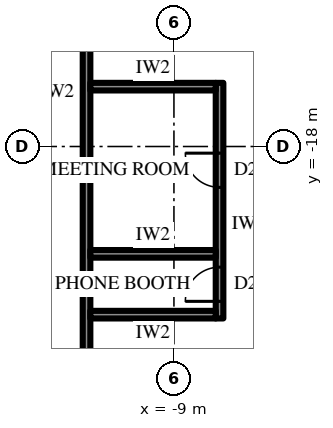
"""IFC4 building model, lengths in metres.
Left out: names, types, materials, properties, quantities, classifications, styles, units other than length and angle.
Written with IfcOpenShell. Run it as: python <this file> out.ifc"""

import sys

from ifc_helpers import new_model, si_unit, direction, frame, frame_2d, origin, place, context, subcontext, project, spatial, rectangle, extrude, element, fill, save


model = new_model("IFC4")
c1 = context("Model", 3, precision=1e-05, world=origin(), true_north=direction((0.0, 1.0)))
c2 = subcontext(c1, "Body", "Model", "MODEL_VIEW")
j1 = project(units=[si_unit("LENGTHUNIT", "METRE"), si_unit("PLANEANGLEUNIT", "RADIAN")], contexts=[c1])
p1 = place(None, origin())
s1 = spatial("IfcSite", under=j1, at=p1, CompositionType="ELEMENT")
p2 = place(p1, origin())
s2 = spatial("IfcBuilding", under=s1, at=p2, CompositionType="ELEMENT")
p3 = place(p2, frame((0.0, 0.0, 387.1)))
s3 = spatial("IfcBuildingStorey", under=s2, at=p3, CompositionType="ELEMENT", Elevation=387.1)
p4 = place(p3, frame((-11.3, -12.3, 0.0), z_axis=(0.0, 0.0, 1.0), x_axis=(0.0, -1.0, 0.0)))
e1 = element("IfcWall", 1, at=p4, inside=s3, PredefinedType="PARTITIONING", context=c2, shape_type="SweptSolid", body=[
    extrude(rectangle(XDim=14.25, YDim=0.2, at=frame_2d((7.125, 0.0))), origin(), (0.0, 0.0, 1.0), 4.0),
])
p5 = place(p4, frame((0.925, 0.0, 0.0)))
e2 = element("IfcOpeningElement", 2, at=p5, cuts=e1, PredefinedType="OPENING", context=c2, shape_type="SweptSolid", body=[
    extrude(rectangle(XDim=1.0, YDim=2.2, at=frame_2d((0.5, 1.1))), frame((0.0, 0.11, 0.0), z_axis=(0.0, -1.0, 0.0), x_axis=(1.0, 0.0, 0.0)), (0.0, 0.0, 1.0), 0.22),
])
p6 = place(p3, frame((-7.8, -16.325, 0.0), z_axis=(0.0, 0.0, 1.0), x_axis=(0.0, -1.0, 0.0)))
e3 = element("IfcWall", 3, at=p6, inside=s3, PredefinedType="PARTITIONING", context=c2, shape_type="SweptSolid", body=[
    extrude(rectangle(XDim=6.2, YDim=0.2, at=frame_2d((3.1, 0.0))), origin(), (0.0, 0.0, 1.0), 4.0),
])
p7 = place(p6, frame((1.85, 0.0, 0.0)))
e4 = element("IfcOpeningElement", 4, at=p7, cuts=e3, PredefinedType="OPENING", context=c2, shape_type="SweptSolid", body=[
    extrude(rectangle(XDim=0.9, YDim=2.2, at=frame_2d((0.45, 1.1))), frame((0.0, 0.11, 0.0), z_axis=(0.0, -1.0, 0.0), x_axis=(1.0, 0.0, 0.0)), (0.0, 0.0, 1.0), 0.22),
])
p8 = place(p6, frame((4.85, 0.0, 0.0)))
e5 = element("IfcOpeningElement", 5, at=p8, cuts=e3, PredefinedType="OPENING", context=c2, shape_type="SweptSolid", body=[
    extrude(rectangle(XDim=0.9, YDim=2.2, at=frame_2d((0.45, 1.1))), frame((0.0, 0.11, 0.0), z_axis=(0.0, -1.0, 0.0), x_axis=(1.0, 0.0, 0.0)), (0.0, 0.0, 1.0), 0.22),
])
for number, where, z_axis, x_axis in (
    (6, (-11.2, -16.425, 0.0), (0.0, 0.0, 1.0), (1.0, 0.0, 0.0)),
    (7, (-11.2, -20.825, 0.0), (0.0, 0.0, 1.0), (1.0, 0.0, 0.0)),
    (8, (-11.2, -22.425, 0.0), (0.0, 0.0, 1.0), (1.0, 0.0, 0.0)),
):
    element("IfcWall", number, at=place(p3, frame(where, z_axis=z_axis, x_axis=x_axis)), inside=s3, PredefinedType="PARTITIONING", context=c2, shape_type="SweptSolid", body=[
        extrude(rectangle(XDim=3.3, YDim=0.2, at=frame_2d((1.65, 0.0))), origin(), (0.0, 0.0, 1.0), 4.0),
    ])
p9 = place(p7, frame((0.9, 0.0, 0.0), z_axis=(0.0, 0.0, 1.0), x_axis=(-1.0, 0.0, 0.0)))
e9 = element("IfcDoor", 9, at=p9, inside=s3, OperationType="SINGLE_SWING_LEFT", PredefinedType="DOOR", context=c2, shape_type="SweptSolid", body=[
    extrude(rectangle(XDim=0.9, YDim=2.2, at=frame_2d((0.45, 1.1))), frame((0.0, 0.025, 0.0), z_axis=(0.0, -1.0, 0.0), x_axis=(1.0, 0.0, 0.0)), (0.0, 0.0, 1.0), 0.05),
])
fill(e4, e9)
p10 = place(p8, frame((0.9, 0.0, 0.0), z_axis=(0.0, 0.0, 1.0), x_axis=(-1.0, 0.0, 0.0)))
e10 = element("IfcDoor", 10, at=p10, inside=s3, OperationType="SINGLE_SWING_RIGHT", PredefinedType="DOOR", context=c2, shape_type="SweptSolid", body=[
    extrude(rectangle(XDim=0.9, YDim=2.2, at=frame_2d((0.45, 1.1))), frame((0.0, 0.025, 0.0), z_axis=(0.0, -1.0, 0.0), x_axis=(1.0, 0.0, 0.0)), (0.0, 0.0, 1.0), 0.05),
])
fill(e5, e10)
save(model, sys.argv[1])
